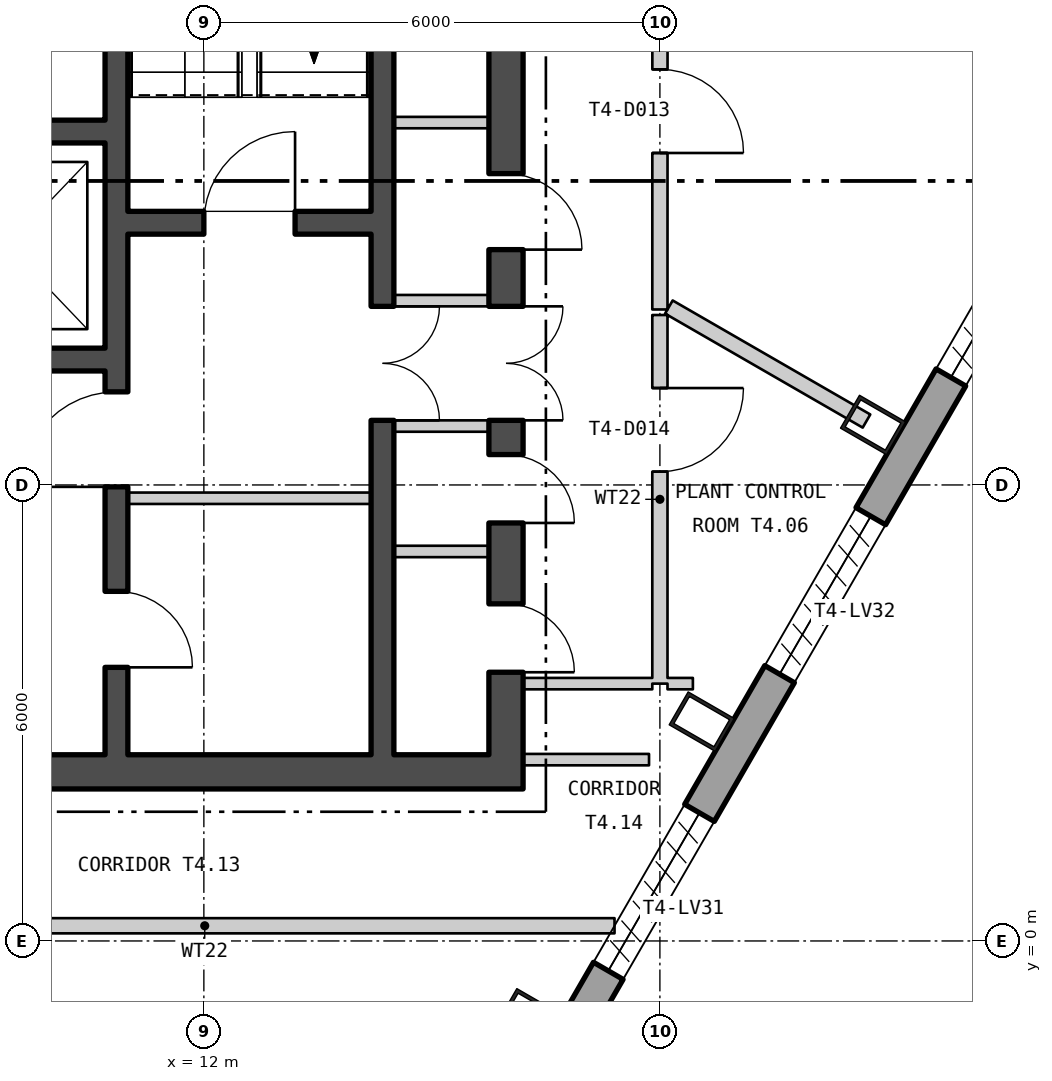
"""IFC4 building model, lengths in metres.
Left out: names, types, materials, properties, quantities, classifications, styles, units other than length and angle.
Written with IfcOpenShell. Run it as: python <this file> out.ifc"""

import sys

from ifc_helpers import new_model, si_unit, direction, frame, frame_2d, origin, origin_2d, place, context, subcontext, project, spatial, polyline, rectangle, hollow_rectangle, outline, extrude, element, fill, save


model = new_model("IFC4")
c1 = context("Model", 3, precision=1e-05, world=origin(), true_north=direction((0.0, 1.0)))
c2 = subcontext(c1, "Body", "Model", "MODEL_VIEW")
j1 = project(units=[si_unit("LENGTHUNIT", "METRE"), si_unit("PLANEANGLEUNIT", "RADIAN")], contexts=[c1])
p1 = place(None, origin())
s1 = spatial("IfcSite", under=j1, at=p1, CompositionType="ELEMENT")
p2 = place(p1, origin())
s2 = spatial("IfcBuilding", under=s1, at=p2, CompositionType="ELEMENT")
p3 = place(p2, frame((0.0, 0.0, 239.4)))
s3 = spatial("IfcBuildingStorey", under=s2, at=p3, CompositionType="ELEMENT", Elevation=239.4)
for number, where, z_axis, x_axis in (
    (1, (16.296, -1.018, 0.0), (0.0, 0.0, 1.0), (0.5, 0.866, 0.0)),
    (2, (18.55, 2.886, 0.0), (0.0, 0.0, 1.0), (0.5, 0.866, 0.0)),
    (3, (20.804, 6.789, 0.0), (0.0, 0.0, 1.0), (0.5, 0.866, 0.0)),
):
    element("IfcColumn", number, at=place(p3, frame(where, z_axis=z_axis, x_axis=x_axis)), inside=s3, PredefinedType="COLUMN", context=c2, shape_type="SweptSolid", body=[
        extrude(hollow_rectangle(XDim=0.5, YDim=0.7, WallThickness=0.045, at=origin_2d()), origin(), (0.0, 0.0, 1.0), 6.0),
    ])
p4 = place(p3, frame((3.105, -25.015, -0.18), z_axis=(0.0, 0.0, 1.0), x_axis=(0.499999764979, 0.866025539474, 0.0)))
e4 = element("IfcWall", 4, at=p4, inside=s3, PredefinedType="SOLIDWALL", context=c2, shape_type="SweptSolid", body=[
    extrude(outline(polyline([(-0.13, -0.225), (45.87, -0.225), (45.61, 0.225), (0.13, 0.225), (-0.13, -0.225)])), origin(), (0.0, 0.0, 1.0), 6.0),
])
p5 = place(p4, frame((1.424, 0.0, 1.38)))
e5 = element("IfcOpeningElement", 5, at=p5, cuts=e4, PredefinedType="OPENING", context=c2, shape_type="SweptSolid", body=[
    extrude(rectangle(XDim=2.4, YDim=3.6, at=frame_2d((1.2, 1.8))), frame((0.0, 0.235, 0.0), z_axis=(0.0, -1.0, 0.0), x_axis=(1.0, 0.0, 0.0)), (0.0, 0.0, 1.0), 0.47),
])
p6 = place(p4, frame((5.893, 0.0, 1.38)))
e6 = element("IfcOpeningElement", 6, at=p6, cuts=e4, PredefinedType="OPENING", context=c2, shape_type="SweptSolid", body=[
    extrude(rectangle(XDim=2.4, YDim=3.6, at=frame_2d((1.2, 1.8))), frame((0.0, 0.235, 0.0), z_axis=(0.0, -1.0, 0.0), x_axis=(1.0, 0.0, 0.0)), (0.0, 0.0, 1.0), 0.47),
])
p7 = place(p4, frame((10.401, 0.0, 1.38)))
e7 = element("IfcOpeningElement", 7, at=p7, cuts=e4, PredefinedType="OPENING", context=c2, shape_type="SweptSolid", body=[
    extrude(rectangle(XDim=2.4, YDim=3.6, at=frame_2d((1.2, 1.8))), frame((0.0, 0.235, 0.0), z_axis=(0.0, -1.0, 0.0), x_axis=(1.0, 0.0, 0.0)), (0.0, 0.0, 1.0), 0.47),
])
p8 = place(p4, frame((14.909, 0.0, 1.38)))
e8 = element("IfcOpeningElement", 8, at=p8, cuts=e4, PredefinedType="OPENING", context=c2, shape_type="SweptSolid", body=[
    extrude(rectangle(XDim=2.4, YDim=3.6, at=frame_2d((1.2, 1.8))), frame((0.0, 0.235, 0.0), z_axis=(0.0, -1.0, 0.0), x_axis=(1.0, 0.0, 0.0)), (0.0, 0.0, 1.0), 0.47),
])
p9 = place(p4, frame((19.416, 0.0, 1.38)))
e9 = element("IfcOpeningElement", 9, at=p9, cuts=e4, PredefinedType="OPENING", context=c2, shape_type="SweptSolid", body=[
    extrude(rectangle(XDim=2.4, YDim=3.6, at=frame_2d((1.2, 1.8))), frame((0.0, 0.235, 0.0), z_axis=(0.0, -1.0, 0.0), x_axis=(1.0, 0.0, 0.0)), (0.0, 0.0, 1.0), 0.47),
])
p10 = place(p4, frame((23.924, 0.0, 1.38)))
e10 = element("IfcOpeningElement", 10, at=p10, cuts=e4, PredefinedType="OPENING", context=c2, shape_type="SweptSolid", body=[
    extrude(rectangle(XDim=2.4, YDim=3.6, at=frame_2d((1.2, 1.8))), frame((0.0, 0.235, 0.0), z_axis=(0.0, -1.0, 0.0), x_axis=(1.0, 0.0, 0.0)), (0.0, 0.0, 1.0), 0.47),
])
p11 = place(p4, frame((28.431, 0.0, 1.38)))
e11 = element("IfcOpeningElement", 11, at=p11, cuts=e4, PredefinedType="OPENING", context=c2, shape_type="SweptSolid", body=[
    extrude(rectangle(XDim=2.4, YDim=3.6, at=frame_2d((1.2, 1.8))), frame((0.0, 0.235, 0.0), z_axis=(0.0, -1.0, 0.0), x_axis=(1.0, 0.0, 0.0)), (0.0, 0.0, 1.0), 0.47),
])
p12 = place(p4, frame((32.939, 0.0, 1.38)))
e12 = element("IfcOpeningElement", 12, at=p12, cuts=e4, PredefinedType="OPENING", context=c2, shape_type="SweptSolid", body=[
    extrude(rectangle(XDim=2.4, YDim=3.6, at=frame_2d((1.2, 1.8))), frame((0.0, 0.235, 0.0), z_axis=(0.0, -1.0, 0.0), x_axis=(1.0, 0.0, 0.0)), (0.0, 0.0, 1.0), 0.47),
])
p13 = place(p4, frame((37.447, 0.0, 1.38)))
e13 = element("IfcOpeningElement", 13, at=p13, cuts=e4, PredefinedType="OPENING", context=c2, shape_type="SweptSolid", body=[
    extrude(rectangle(XDim=2.4, YDim=3.6, at=frame_2d((1.2, 1.8))), frame((0.0, 0.235, 0.0), z_axis=(0.0, -1.0, 0.0), x_axis=(1.0, 0.0, 0.0)), (0.0, 0.0, 1.0), 0.47),
])
p14 = place(p4, frame((41.916, 0.0, 1.38)))
e14 = element("IfcOpeningElement", 14, at=p14, cuts=e4, PredefinedType="OPENING", context=c2, shape_type="SweptSolid", body=[
    extrude(rectangle(XDim=2.4, YDim=3.6, at=frame_2d((1.2, 1.8))), frame((0.0, 0.235, 0.0), z_axis=(0.0, -1.0, 0.0), x_axis=(1.0, 0.0, 0.0)), (0.0, 0.0, 1.0), 0.47),
])
p15 = place(p3, frame((-16.2, 2.225, 0.0), z_axis=(0.0, 0.0, 1.0), x_axis=(1.0, 0.0, 0.0)))
e15 = element("IfcWall", 15, at=p15, inside=s3, PredefinedType="SHEAR", context=c2, shape_type="SweptSolid", body=[
    extrude(rectangle(XDim=32.4, YDim=0.45, at=frame_2d((16.2, 0.0))), origin(), (0.0, 0.0, 1.0), 5.8),
])
p16 = place(p15, frame((10.7, 0.0, 0.0)))
e16 = element("IfcOpeningElement", 16, at=p16, cuts=e15, PredefinedType="OPENING", context=c2, shape_type="SweptSolid", body=[
    extrude(rectangle(XDim=1.8, YDim=2.4, at=frame_2d((0.9, 1.2))), frame((0.0, 0.235, 0.0), z_axis=(0.0, -1.0, 0.0), x_axis=(1.0, 0.0, 0.0)), (0.0, 0.0, 1.0), 0.47),
])
p17 = place(p15, frame((20.7, 0.0, 0.0)))
e17 = element("IfcOpeningElement", 17, at=p17, cuts=e15, PredefinedType="OPENING", context=c2, shape_type="SweptSolid", body=[
    extrude(rectangle(XDim=1.8, YDim=2.4, at=frame_2d((0.9, 1.2))), frame((0.0, 0.235, 0.0), z_axis=(0.0, -1.0, 0.0), x_axis=(1.0, 0.0, 0.0)), (0.0, 0.0, 1.0), 0.47),
])
p18 = place(p3, frame((15.975, 2.45, 0.0), z_axis=(0.0, 0.0, 1.0), x_axis=(0.0, 1.0, 0.0)))
e18 = element("IfcWall", 18, at=p18, inside=s3, PredefinedType="SHEAR", context=c2, shape_type="SweptSolid", body=[
    extrude(rectangle(XDim=15.1, YDim=0.45, at=frame_2d((7.55, 0.0))), origin(), (0.0, 0.0, 1.0), 5.8),
])
p19 = place(p18, frame((4.4, 0.0, 0.0)))
e19 = element("IfcOpeningElement", 19, at=p19, cuts=e18, PredefinedType="OPENING", context=c2, shape_type="SweptSolid", body=[
    extrude(rectangle(XDim=1.5, YDim=2.1, at=frame_2d((0.75, 1.05))), frame((0.0, 0.235, 0.0), z_axis=(0.0, -1.0, 0.0), x_axis=(1.0, 0.0, 0.0)), (0.0, 0.0, 1.0), 0.47),
])
p20 = place(p18, frame((1.086, 0.0, 0.0)))
e20 = element("IfcOpeningElement", 20, at=p20, cuts=e18, PredefinedType="OPENING", context=c2, shape_type="SweptSolid", body=[
    extrude(rectangle(XDim=0.9, YDim=2.1, at=frame_2d((0.45, 1.05))), frame((0.0, 0.235, 0.0), z_axis=(0.0, -1.0, 0.0), x_axis=(1.0, 0.0, 0.0)), (0.0, 0.0, 1.0), 0.47),
])
p21 = place(p18, frame((3.05, 0.0, 0.0)))
e21 = element("IfcOpeningElement", 21, at=p21, cuts=e18, PredefinedType="OPENING", context=c2, shape_type="SweptSolid", body=[
    extrude(rectangle(XDim=0.9, YDim=2.1, at=frame_2d((0.45, 1.05))), frame((0.0, 0.235, 0.0), z_axis=(0.0, -1.0, 0.0), x_axis=(1.0, 0.0, 0.0)), (0.0, 0.0, 1.0), 0.47),
])
p22 = place(p18, frame((6.646, 0.0, 0.0)))
e22 = element("IfcOpeningElement", 22, at=p22, cuts=e18, PredefinedType="OPENING", context=c2, shape_type="SweptSolid", body=[
    extrude(rectangle(XDim=1.0, YDim=2.1, at=frame_2d((0.5, 1.05))), frame((0.0, 0.235, 0.0), z_axis=(0.0, -1.0, 0.0), x_axis=(1.0, 0.0, 0.0)), (0.0, 0.0, 1.0), 0.47),
])
p23 = place(p18, frame((11.296, 0.0, 0.0)))
e23 = element("IfcOpeningElement", 23, at=p23, cuts=e18, PredefinedType="OPENING", context=c2, shape_type="SweptSolid", body=[
    extrude(rectangle(XDim=0.9, YDim=2.1, at=frame_2d((0.45, 1.05))), frame((0.0, 0.235, 0.0), z_axis=(0.0, -1.0, 0.0), x_axis=(1.0, 0.0, 0.0)), (0.0, 0.0, 1.0), 0.47),
])
p24 = place(p3, frame((10.85, 2.45, 0.0), z_axis=(0.0, 0.0, 1.0), x_axis=(0.0, 1.0, 0.0)))
e24 = element("IfcWall", 24, at=p24, inside=s3, PredefinedType="SHEAR", context=c2, shape_type="SweptSolid", body=[
    extrude(rectangle(XDim=15.1, YDim=0.3, at=frame_2d((7.55, 0.0))), origin(), (0.0, 0.0, 1.0), 5.8),
])
p25 = place(p24, frame((3.525, 0.0, 0.0)))
e25 = element("IfcOpeningElement", 25, at=p25, cuts=e24, PredefinedType="OPENING", context=c2, shape_type="SweptSolid", body=[
    extrude(rectangle(XDim=1.25, YDim=2.1, at=frame_2d((0.625, 1.05))), frame((0.0, 0.16, 0.0), z_axis=(0.0, -1.0, 0.0), x_axis=(1.0, 0.0, 0.0)), (0.0, 0.0, 1.0), 0.32),
])
p26 = place(p24, frame((1.15, 0.0, 0.0)))
e26 = element("IfcOpeningElement", 26, at=p26, cuts=e24, PredefinedType="OPENING", context=c2, shape_type="SweptSolid", body=[
    extrude(rectangle(XDim=1.0, YDim=2.1, at=frame_2d((0.5, 1.05))), frame((0.0, 0.16, 0.0), z_axis=(0.0, -1.0, 0.0), x_axis=(1.0, 0.0, 0.0)), (0.0, 0.0, 1.0), 0.32),
])
p27 = place(p3, frame((14.35, 2.45, 0.0), z_axis=(0.0, 0.0, 1.0), x_axis=(0.0, 1.0, 0.0)))
e27 = element("IfcWall", 27, at=p27, inside=s3, PredefinedType="SHEAR", context=c2, shape_type="SweptSolid", body=[
    extrude(rectangle(XDim=15.1, YDim=0.3, at=frame_2d((7.55, 0.0))), origin(), (0.0, 0.0, 1.0), 5.8),
])
p28 = place(p27, frame((4.4, 0.0, 0.0)))
e28 = element("IfcOpeningElement", 28, at=p28, cuts=e27, PredefinedType="OPENING", context=c2, shape_type="SweptSolid", body=[
    extrude(rectangle(XDim=1.5, YDim=2.1, at=frame_2d((0.75, 1.05))), frame((0.0, 0.16, 0.0), z_axis=(0.0, -1.0, 0.0), x_axis=(1.0, 0.0, 0.0)), (0.0, 0.0, 1.0), 0.32),
])
p29 = place(p3, frame((11.0, 9.45, 0.0), z_axis=(0.0, 0.0, 1.0), x_axis=(1.0, 0.0, 0.0)))
e29 = element("IfcWall", 29, at=p29, inside=s3, PredefinedType="SHEAR", context=c2, shape_type="SweptSolid", body=[
    extrude(rectangle(XDim=3.2, YDim=0.3, at=frame_2d((1.6, 0.0))), origin(), (0.0, 0.0, 1.0), 5.8),
])
p30 = place(p29, frame((1.0, 0.0, 0.0)))
e30 = element("IfcOpeningElement", 30, at=p30, cuts=e29, PredefinedType="OPENING", context=c2, shape_type="SweptSolid", body=[
    extrude(rectangle(XDim=1.2, YDim=2.1, at=frame_2d((0.6, 1.05))), frame((0.0, 0.16, 0.0), z_axis=(0.0, -1.0, 0.0), x_axis=(1.0, 0.0, 0.0)), (0.0, 0.0, 1.0), 0.32),
])
p31 = place(p3, frame((2.6, 10.65, 0.0), z_axis=(0.0, 0.0, 1.0), x_axis=(1.0, 0.0, 0.0)))
e31 = element("IfcWall", 31, at=p31, inside=s3, PredefinedType="SHEAR", context=c2, shape_type="SweptSolid", body=[
    extrude(rectangle(XDim=8.1, YDim=0.3, at=frame_2d((4.05, 0.0))), origin(), (0.0, 0.0, 1.0), 5.8),
])
p32 = place(p31, frame((3.55, 0.0, 0.0)))
e32 = element("IfcOpeningElement", 32, at=p32, cuts=e31, PredefinedType="OPENING", context=c2, shape_type="SweptSolid", body=[
    extrude(rectangle(XDim=1.1, YDim=2.1, at=frame_2d((0.55, 1.05))), frame((0.0, 0.16, 0.0), z_axis=(0.0, -1.0, 0.0), x_axis=(1.0, 0.0, 0.0)), (0.0, 0.0, 1.0), 0.32),
])
p33 = place(p31, frame((6.267, 0.0, 0.0)))
e33 = element("IfcOpeningElement", 33, at=p33, cuts=e31, PredefinedType="OPENING", context=c2, shape_type="SweptSolid", body=[
    extrude(rectangle(XDim=1.1, YDim=2.1, at=frame_2d((0.55, 1.05))), frame((0.0, 0.16, 0.0), z_axis=(0.0, -1.0, 0.0), x_axis=(1.0, 0.0, 0.0)), (0.0, 0.0, 1.0), 0.32),
])
p34 = place(p31, frame((0.933, 0.0, 0.0)))
e34 = element("IfcOpeningElement", 34, at=p34, cuts=e31, PredefinedType="OPENING", context=c2, shape_type="SweptSolid", body=[
    extrude(rectangle(XDim=1.0, YDim=2.1, at=frame_2d((0.5, 1.05))), frame((0.0, 0.16, 0.0), z_axis=(0.0, -1.0, 0.0), x_axis=(1.0, 0.0, 0.0)), (0.0, 0.0, 1.0), 0.32),
])
p35 = place(p3, frame((2.6, 7.65, 0.0), z_axis=(0.0, 0.0, 1.0), x_axis=(1.0, 0.0, 0.0)))
e35 = element("IfcWall", 35, at=p35, inside=s3, PredefinedType="SHEAR", context=c2, shape_type="SweptSolid", body=[
    extrude(rectangle(XDim=8.1, YDim=0.3, at=frame_2d((4.05, 0.0))), origin(), (0.0, 0.0, 1.0), 5.8),
])
p36 = place(p3, frame((11.0, 5.825, 0.0), z_axis=(0.0, 0.0, 1.0), x_axis=(1.0, 0.0, 0.0)))
e36 = element("IfcWall", 36, at=p36, inside=s3, PredefinedType="PARTITIONING", context=c2, shape_type="SweptSolid", body=[
    extrude(rectangle(XDim=3.2, YDim=0.15, at=frame_2d((1.6, 0.0))), origin(), (0.0, 0.0, 1.0), 5.8),
])
for number, where, z_axis, x_axis in (
    (37, (14.5, 6.775, 0.0), (0.0, 0.0, 1.0), (1.0, 0.0, 0.0)),
    (38, (14.5, 8.425, 0.0), (0.0, 0.0, 1.0), (1.0, 0.0, 0.0)),
    (39, (14.5, 5.125, 0.0), (0.0, 0.0, 1.0), (1.0, 0.0, 0.0)),
    (40, (14.5, 10.768, 0.0), (0.0, 0.0, 1.0), (1.0, 0.0, 0.0)),
):
    element("IfcWall", number, at=place(p3, frame(where, z_axis=z_axis, x_axis=x_axis)), inside=s3, PredefinedType="PARTITIONING", context=c2, shape_type="SweptSolid", body=[
        extrude(rectangle(XDim=1.25, YDim=0.15, at=frame_2d((0.625, 0.0))), origin(), (0.0, 0.0, 1.0), 5.8),
    ])
p37 = place(p3, frame((6.62, 0.2, 0.0), z_axis=(0.0, 0.0, 1.0), x_axis=(1.0, 0.0, 0.0)))
e41 = element("IfcWall", 41, at=p37, inside=s3, PredefinedType="PARTITIONING", context=c2, shape_type="SweptSolid", body=[
    extrude(rectangle(XDim=10.783, YDim=0.2, at=frame_2d((5.391, 0.0))), origin(), (0.0, 0.0, 1.0), 5.8),
])
p38 = place(p3, frame((16.2, 2.386, 0.0), z_axis=(0.0, 0.0, 1.0), x_axis=(1.0, 0.0, 0.0)))
e42 = element("IfcWall", 42, at=p38, inside=s3, PredefinedType="PARTITIONING", context=c2, shape_type="SweptSolid", body=[
    extrude(rectangle(XDim=1.657, YDim=0.15, at=frame_2d((0.829, 0.0))), origin(), (0.0, 0.0, 1.0), 5.8),
])
p39 = place(p3, frame((16.2, 3.386, 0.0), z_axis=(0.0, 0.0, 1.0), x_axis=(1.0, 0.0, 0.0)))
e43 = element("IfcWall", 43, at=p39, inside=s3, PredefinedType="PARTITIONING", context=c2, shape_type="SweptSolid", body=[
    extrude(rectangle(XDim=1.7, YDim=0.15, at=frame_2d((0.85, 0.0))), origin(), (0.0, 0.0, 1.0), 5.8),
])
p40 = place(p3, frame((18.0, 8.309, 0.0), z_axis=(0.0, 0.0, 1.0), x_axis=(0.000189825357, 0.999999981983, 0.0)))
e44 = element("IfcWall", 44, at=p40, inside=s3, PredefinedType="PARTITIONING", context=c2, shape_type="SweptSolid", body=[
    extrude(rectangle(XDim=5.268, YDim=0.2, at=frame_2d((2.634, 0.0))), origin(), (0.0, 0.0, 1.0), 5.8),
])
p41 = place(p40, frame((2.059, 0.0, 0.0)))
e45 = element("IfcOpeningElement", 45, at=p41, cuts=e44, PredefinedType="OPENING", context=c2, shape_type="SweptSolid", body=[
    extrude(rectangle(XDim=1.1, YDim=2.1, at=frame_2d((0.55, 1.05))), frame((0.0, 0.11, 0.0), z_axis=(0.0, -1.0, 0.0), x_axis=(1.0, 0.0, 0.0)), (0.0, 0.0, 1.0), 0.22),
])
p42 = place(p3, frame((18.0, 3.386, 0.0), z_axis=(0.0, 0.0, 1.0), x_axis=(0.0, 1.0, 0.0)))
e46 = element("IfcWall", 46, at=p42, inside=s3, PredefinedType="PARTITIONING", context=c2, shape_type="SweptSolid", body=[
    extrude(rectangle(XDim=4.85, YDim=0.2, at=frame_2d((2.425, 0.0))), origin(), (0.0, 0.0, 1.0), 5.8),
])
p43 = place(p42, frame((2.789, 0.0, 0.0)))
e47 = element("IfcOpeningElement", 47, at=p43, cuts=e46, PredefinedType="OPENING", context=c2, shape_type="SweptSolid", body=[
    extrude(rectangle(XDim=1.1, YDim=2.1, at=frame_2d((0.55, 1.05))), frame((0.0, 0.11, 0.0), z_axis=(0.0, -1.0, 0.0), x_axis=(1.0, 0.0, 0.0)), (0.0, 0.0, 1.0), 0.22),
])
p44 = place(p3, frame((18.1, 3.386, 0.0), z_axis=(0.0, 0.0, 1.0), x_axis=(1.0, 0.0, 0.0)))
e48 = element("IfcWall", 48, at=p44, inside=s3, PredefinedType="PARTITIONING", context=c2, shape_type="SweptSolid", body=[
    extrude(rectangle(XDim=0.334, YDim=0.15, at=frame_2d((0.167, 0.0))), origin(), (0.0, 0.0, 1.0), 5.8),
])
p45 = place(p3, frame((18.118, 8.341, 0.0), z_axis=(0.0, 0.0, 1.0), x_axis=(0.866185586049, -0.49972245349, 0.0)))
e49 = element("IfcWall", 49, at=p45, inside=s3, PredefinedType="PARTITIONING", context=c2, shape_type="SweptSolid", body=[
    extrude(rectangle(XDim=3.002, YDim=0.2, at=frame_2d((1.501, 0.0))), origin(), (0.0, 0.0, 1.0), 5.8),
])
p46 = place(p30, origin())
e50 = element("IfcDoor", 50, at=p46, inside=s3, OperationType="SINGLE_SWING_LEFT", PredefinedType="DOOR", context=c2, shape_type="SweptSolid", body=[
    extrude(rectangle(XDim=1.2, YDim=2.1, at=frame_2d((0.6, 1.05))), frame((0.0, 0.025, 0.0), z_axis=(0.0, -1.0, 0.0), x_axis=(1.0, 0.0, 0.0)), (0.0, 0.0, 1.0), 0.05),
])
fill(e30, e50)
p47 = place(p25, origin())
e51 = element("IfcDoor", 51, at=p47, inside=s3, OperationType="SINGLE_SWING_RIGHT", PredefinedType="DOOR", context=c2, shape_type="SweptSolid", body=[
    extrude(rectangle(XDim=1.25, YDim=2.1, at=frame_2d((0.625, 1.05))), frame((0.0, 0.025, 0.0), z_axis=(0.0, -1.0, 0.0), x_axis=(1.0, 0.0, 0.0)), (0.0, 0.0, 1.0), 0.05),
])
fill(e25, e51)
p48 = place(p26, origin())
e52 = element("IfcDoor", 52, at=p48, inside=s3, OperationType="SINGLE_SWING_LEFT", PredefinedType="DOOR", context=c2, shape_type="SweptSolid", body=[
    extrude(rectangle(XDim=1.0, YDim=2.1, at=frame_2d((0.5, 1.05))), frame((0.0, 0.025, 0.0), z_axis=(0.0, -1.0, 0.0), x_axis=(1.0, 0.0, 0.0)), (0.0, 0.0, 1.0), 0.05),
])
fill(e26, e52)
p49 = place(p28, origin())
e53 = element("IfcDoor", 53, at=p49, inside=s3, OperationType="DOUBLE_DOOR_SINGLE_SWING", PredefinedType="DOOR", context=c2, shape_type="SweptSolid", body=[
    extrude(rectangle(XDim=1.5, YDim=2.1, at=frame_2d((0.75, 1.05))), frame((0.0, 0.025, 0.0), z_axis=(0.0, -1.0, 0.0), x_axis=(1.0, 0.0, 0.0)), (0.0, 0.0, 1.0), 0.05),
])
fill(e28, e53)
p50 = place(p19, origin())
e54 = element("IfcDoor", 54, at=p50, inside=s3, OperationType="DOUBLE_DOOR_SINGLE_SWING", PredefinedType="DOOR", context=c2, shape_type="SweptSolid", body=[
    extrude(rectangle(XDim=1.5, YDim=2.1, at=frame_2d((0.75, 1.05))), frame((0.0, 0.025, 0.0), z_axis=(0.0, -1.0, 0.0), x_axis=(1.0, 0.0, 0.0)), (0.0, 0.0, 1.0), 0.05),
])
fill(e19, e54)
p51 = place(p20, origin())
e55 = element("IfcDoor", 55, at=p51, inside=s3, OperationType="SINGLE_SWING_LEFT", PredefinedType="DOOR", context=c2, shape_type="SweptSolid", body=[
    extrude(rectangle(XDim=0.9, YDim=2.1, at=frame_2d((0.45, 1.05))), frame((0.0, 0.025, 0.0), z_axis=(0.0, -1.0, 0.0), x_axis=(1.0, 0.0, 0.0)), (0.0, 0.0, 1.0), 0.05),
])
fill(e20, e55)
p52 = place(p21, origin())
e56 = element("IfcDoor", 56, at=p52, inside=s3, OperationType="SINGLE_SWING_LEFT", PredefinedType="DOOR", context=c2, shape_type="SweptSolid", body=[
    extrude(rectangle(XDim=0.9, YDim=2.1, at=frame_2d((0.45, 1.05))), frame((0.0, 0.025, 0.0), z_axis=(0.0, -1.0, 0.0), x_axis=(1.0, 0.0, 0.0)), (0.0, 0.0, 1.0), 0.05),
])
fill(e21, e56)
p53 = place(p22, origin())
e57 = element("IfcDoor", 57, at=p53, inside=s3, OperationType="SINGLE_SWING_LEFT", PredefinedType="DOOR", context=c2, shape_type="SweptSolid", body=[
    extrude(rectangle(XDim=1.0, YDim=2.1, at=frame_2d((0.5, 1.05))), frame((0.0, 0.025, 0.0), z_axis=(0.0, -1.0, 0.0), x_axis=(1.0, 0.0, 0.0)), (0.0, 0.0, 1.0), 0.05),
])
fill(e22, e57)
p54 = place(p41, origin())
e58 = element("IfcDoor", 58, at=p54, inside=s3, OperationType="SINGLE_SWING_LEFT", PredefinedType="DOOR", context=c2, shape_type="SweptSolid", body=[
    extrude(rectangle(XDim=1.1, YDim=2.1, at=frame_2d((0.55, 1.05))), frame((0.0, 0.025, 0.0), z_axis=(0.0, -1.0, 0.0), x_axis=(1.0, 0.0, 0.0)), (0.0, 0.0, 1.0), 0.05),
])
fill(e45, e58)
p55 = place(p43, origin())
e59 = element("IfcDoor", 59, at=p55, inside=s3, OperationType="SINGLE_SWING_RIGHT", PredefinedType="DOOR", context=c2, shape_type="SweptSolid", body=[
    extrude(rectangle(XDim=1.1, YDim=2.1, at=frame_2d((0.55, 1.05))), frame((0.0, 0.025, 0.0), z_axis=(0.0, -1.0, 0.0), x_axis=(1.0, 0.0, 0.0)), (0.0, 0.0, 1.0), 0.05),
])
fill(e47, e59)
save(model, sys.argv[1])
